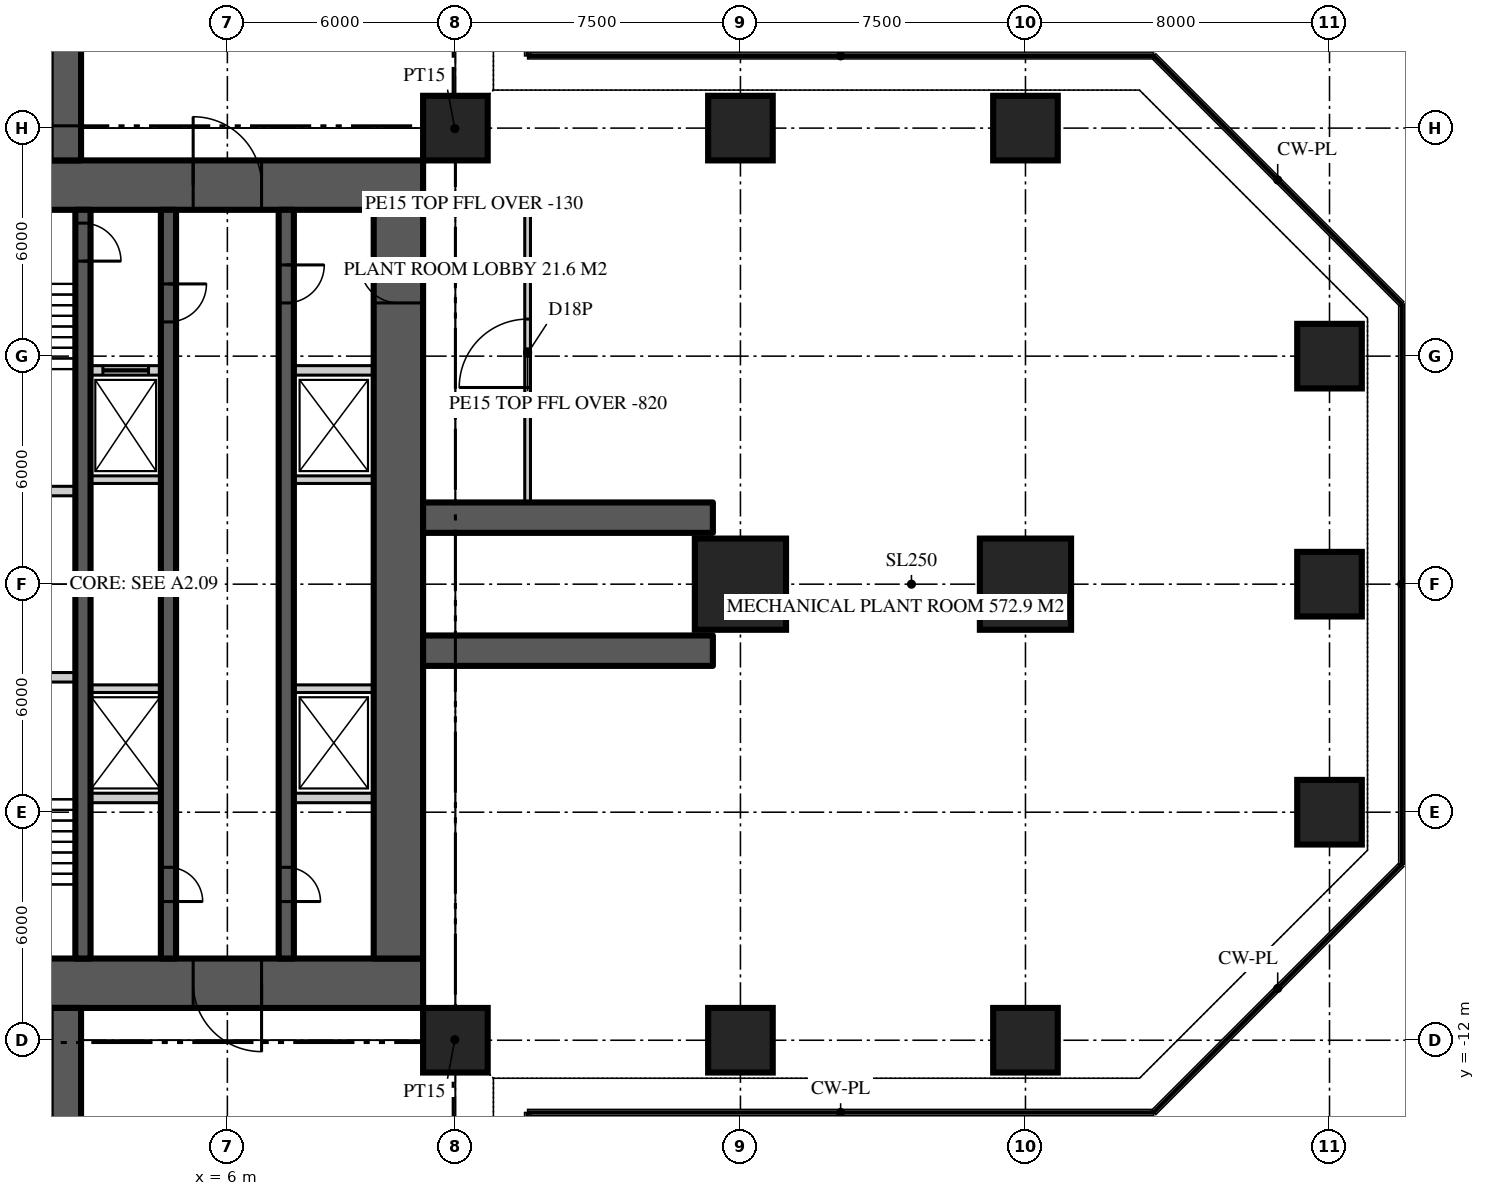
"""IFC4 building model, lengths in metres.
Left out: names, types, materials, properties, quantities, classifications, styles, units other than length and angle.
Written with IfcOpenShell. Run it as: python <this file> out.ifc"""

import sys

from ifc_helpers import new_model, si_unit, direction, frame, frame_2d, origin, origin_2d, place, context, subcontext, project, spatial, rectangle, extrude, element, fill, save


model = new_model("IFC4")
c1 = context("Model", 3, precision=1e-05, world=origin(), true_north=direction((0.0, 1.0)))
c2 = subcontext(c1, "Body", "Model", "MODEL_VIEW")
j1 = project(units=[si_unit("LENGTHUNIT", "METRE"), si_unit("PLANEANGLEUNIT", "RADIAN")], contexts=[c1])
p1 = place(None, origin())
s1 = spatial("IfcSite", under=j1, at=p1, CompositionType="ELEMENT")
p2 = place(p1, origin())
s2 = spatial("IfcBuilding", under=s1, at=p2, CompositionType="ELEMENT")
p3 = place(p2, frame((0.0, 0.0, 37.5)))
s3 = spatial("IfcBuildingStorey", under=s2, at=p3, CompositionType="ELEMENT", Elevation=37.5)
p4 = place(p3, frame((-11.15, 10.5, 0.0), z_axis=(0.0, 0.0, 1.0), x_axis=(1.0, 0.0, 0.0)))
e1 = element("IfcWall", 1, at=p4, inside=s3, PredefinedType="SHEAR", context=c2, shape_type="SweptSolid", body=[
    extrude(rectangle(XDim=22.3, YDim=1.3, at=frame_2d((11.15, 0.0))), origin(), (0.0, 0.0, 1.0), 6.0),
])
p5 = place(p4, frame((4.25, 0.0, 0.0)))
e2 = element("IfcOpeningElement", 2, at=p5, cuts=e1, PredefinedType="OPENING", context=c2, shape_type="SweptSolid", body=[
    extrude(rectangle(XDim=1.8, YDim=2.2, at=frame_2d((0.9, 1.1))), frame((0.0, 0.66, 0.0), z_axis=(0.0, -1.0, 0.0), x_axis=(1.0, 0.0, 0.0)), (0.0, 0.0, 1.0), 1.32),
])
p6 = place(p4, frame((16.25, 0.0, 0.0)))
e3 = element("IfcOpeningElement", 3, at=p6, cuts=e1, PredefinedType="OPENING", context=c2, shape_type="SweptSolid", body=[
    extrude(rectangle(XDim=1.8, YDim=2.2, at=frame_2d((0.9, 1.1))), frame((0.0, 0.66, 0.0), z_axis=(0.0, -1.0, 0.0), x_axis=(1.0, 0.0, 0.0)), (0.0, 0.0, 1.0), 1.32),
])
p7 = place(p3, frame((11.15, -10.5, 0.0), z_axis=(0.0, 0.0, 1.0), x_axis=(-1.0, 0.0, 0.0)))
e4 = element("IfcWall", 4, at=p7, inside=s3, PredefinedType="SHEAR", context=c2, shape_type="SweptSolid", body=[
    extrude(rectangle(XDim=22.3, YDim=1.3, at=frame_2d((11.15, 0.0))), origin(), (0.0, 0.0, 1.0), 6.0),
])
p8 = place(p7, frame((16.25, 0.0, 0.0)))
e5 = element("IfcOpeningElement", 5, at=p8, cuts=e4, PredefinedType="OPENING", context=c2, shape_type="SweptSolid", body=[
    extrude(rectangle(XDim=1.8, YDim=2.2, at=frame_2d((0.9, 1.1))), frame((0.0, 0.66, 0.0), z_axis=(0.0, -1.0, 0.0), x_axis=(1.0, 0.0, 0.0)), (0.0, 0.0, 1.0), 1.32),
])
p9 = place(p7, frame((4.25, 0.0, 0.0)))
e6 = element("IfcOpeningElement", 6, at=p9, cuts=e4, PredefinedType="OPENING", context=c2, shape_type="SweptSolid", body=[
    extrude(rectangle(XDim=1.8, YDim=2.2, at=frame_2d((0.9, 1.1))), frame((0.0, 0.66, 0.0), z_axis=(0.0, -1.0, 0.0), x_axis=(1.0, 0.0, 0.0)), (0.0, 0.0, 1.0), 1.32),
])
p10 = place(p3, frame((10.5, -9.85, 0.0), z_axis=(0.0, 0.0, 1.0), x_axis=(0.0, 1.0, 0.0)))
e7 = element("IfcWall", 7, at=p10, inside=s3, PredefinedType="SHEAR", context=c2, shape_type="SweptSolid", body=[
    extrude(rectangle(XDim=19.7, YDim=1.3, at=frame_2d((9.85, 0.0))), origin(), (0.0, 0.0, 1.0), 6.0),
])
p11 = place(p10, frame((17.25, 0.0, 0.0)))
e8 = element("IfcOpeningElement", 8, at=p11, cuts=e7, PredefinedType="OPENING", context=c2, shape_type="SweptSolid", body=[
    extrude(rectangle(XDim=1.0, YDim=2.2, at=frame_2d((0.5, 1.1))), frame((0.0, 0.66, 0.0), z_axis=(0.0, -1.0, 0.0), x_axis=(1.0, 0.0, 0.0)), (0.0, 0.0, 1.0), 1.32),
])
for number, where, z_axis, x_axis in (
    (9, (11.15, -1.75, 0.0), (0.0, 0.0, 1.0), (1.0, 0.0, 0.0)),
    (10, (11.15, 1.75, 0.0), (0.0, 0.0, 1.0), (1.0, 0.0, 0.0)),
    (11, (1.75, 11.15, 0.0), (0.0, 0.0, 1.0), (0.0, 1.0, 0.0)),
    (12, (1.75, -11.15, 0.0), (0.0, 0.0, 1.0), (0.0, -1.0, 0.0)),
):
    element("IfcWall", number, at=place(p3, frame(where, z_axis=z_axis, x_axis=x_axis)), inside=s3, PredefinedType="SHEAR", context=c2, shape_type="SweptSolid", body=[
        extrude(rectangle(XDim=7.625, YDim=0.8, at=frame_2d((3.812, 0.0))), origin(), (0.0, 0.0, 1.0), 6.0),
    ])
for number, where, z_axis, x_axis in (
    (13, (12.0, -12.0, 0.0), (0.0, 0.0, 1.0), (1.0, 0.0, 0.0)),
    (14, (19.5, -12.0, 0.0), (0.0, 0.0, 1.0), (1.0, 0.0, 0.0)),
    (15, (27.0, -12.0, 0.0), (0.0, 0.0, 1.0), (1.0, 0.0, 0.0)),
    (16, (35.0, -6.0, 0.0), (0.0, 0.0, 1.0), (1.0, 0.0, 0.0)),
):
    element("IfcColumn", number, at=place(p3, frame(where, z_axis=z_axis, x_axis=x_axis)), inside=s3, PredefinedType="COLUMN", context=c2, shape_type="SweptSolid", body=[
        extrude(rectangle(XDim=1.7, YDim=1.7, at=origin_2d()), origin(), (0.0, 0.0, 1.0), 6.0),
    ])
for number, where, z_axis, x_axis in (
    (17, (19.5, 0.0, 0.0), (0.0, 0.0, 1.0), (1.0, 0.0, 0.0)),
    (18, (27.0, 0.0, 0.0), (0.0, 0.0, 1.0), (1.0, 0.0, 0.0)),
):
    element("IfcColumn", number, at=place(p3, frame(where, z_axis=z_axis, x_axis=x_axis)), inside=s3, PredefinedType="COLUMN", context=c2, shape_type="SweptSolid", body=[
        extrude(rectangle(XDim=2.4, YDim=2.4, at=origin_2d()), origin(), (0.0, 0.0, 1.0), 6.0),
    ])
for number, where, z_axis, x_axis in (
    (19, (35.0, 0.0, 0.0), (0.0, 0.0, 1.0), (1.0, 0.0, 0.0)),
    (20, (35.0, 6.0, 0.0), (0.0, 0.0, 1.0), (1.0, 0.0, 0.0)),
    (21, (12.0, 12.0, 0.0), (0.0, 0.0, 1.0), (1.0, 0.0, 0.0)),
    (22, (19.5, 12.0, 0.0), (0.0, 0.0, 1.0), (1.0, 0.0, 0.0)),
    (23, (27.0, 12.0, 0.0), (0.0, 0.0, 1.0), (1.0, 0.0, 0.0)),
):
    element("IfcColumn", number, at=place(p3, frame(where, z_axis=z_axis, x_axis=x_axis)), inside=s3, PredefinedType="COLUMN", context=c2, shape_type="SweptSolid", body=[
        extrude(rectangle(XDim=1.7, YDim=1.7, at=origin_2d()), origin(), (0.0, 0.0, 1.0), 6.0),
    ])
p12 = place(p3, frame((7.55, 9.85, 0.0), z_axis=(0.0, 0.0, 1.0), x_axis=(0.0, -1.0, 0.0)))
e24 = element("IfcWall", 24, at=p12, inside=s3, PredefinedType="SHEAR", context=c2, shape_type="SweptSolid", body=[
    extrude(rectangle(XDim=19.7, YDim=0.4, at=frame_2d((9.85, 0.0))), origin(), (0.0, 0.0, 1.0), 6.0),
])
p13 = place(p12, frame((1.45, 0.0, 0.0)))
e25 = element("IfcOpeningElement", 25, at=p13, cuts=e24, PredefinedType="OPENING", context=c2, shape_type="SweptSolid", body=[
    extrude(rectangle(XDim=1.0, YDim=2.2, at=frame_2d((0.5, 1.1))), frame((0.0, 0.21, 0.0), z_axis=(0.0, -1.0, 0.0), x_axis=(1.0, 0.0, 0.0)), (0.0, 0.0, 1.0), 0.42),
])
p14 = place(p12, frame((17.3, 0.0, 0.0)))
e26 = element("IfcOpeningElement", 26, at=p14, cuts=e24, PredefinedType="OPENING", context=c2, shape_type="SweptSolid", body=[
    extrude(rectangle(XDim=0.9, YDim=2.1, at=frame_2d((0.45, 1.05))), frame((0.0, 0.21, 0.0), z_axis=(0.0, -1.0, 0.0), x_axis=(1.0, 0.0, 0.0)), (0.0, 0.0, 1.0), 0.42),
])
p15 = place(p3, frame((4.45, 9.85, 0.0), z_axis=(0.0, 0.0, 1.0), x_axis=(0.0, -1.0, 0.0)))
e27 = element("IfcWall", 27, at=p15, inside=s3, PredefinedType="SHEAR", context=c2, shape_type="SweptSolid", body=[
    extrude(rectangle(XDim=19.7, YDim=0.4, at=frame_2d((9.85, 0.0))), origin(), (0.0, 0.0, 1.0), 6.0),
])
p16 = place(p15, frame((1.95, 0.0, 0.0)))
e28 = element("IfcOpeningElement", 28, at=p16, cuts=e27, PredefinedType="OPENING", context=c2, shape_type="SweptSolid", body=[
    extrude(rectangle(XDim=1.0, YDim=2.2, at=frame_2d((0.5, 1.1))), frame((0.0, 0.21, 0.0), z_axis=(0.0, -1.0, 0.0), x_axis=(1.0, 0.0, 0.0)), (0.0, 0.0, 1.0), 0.42),
])
p17 = place(p15, frame((17.3, 0.0, 0.0)))
e29 = element("IfcOpeningElement", 29, at=p17, cuts=e27, PredefinedType="OPENING", context=c2, shape_type="SweptSolid", body=[
    extrude(rectangle(XDim=0.9, YDim=2.1, at=frame_2d((0.45, 1.05))), frame((0.0, 0.21, 0.0), z_axis=(0.0, -1.0, 0.0), x_axis=(1.0, 0.0, 0.0)), (0.0, 0.0, 1.0), 0.42),
])
p18 = place(p3, frame((2.2, 9.85, 0.0), z_axis=(0.0, 0.0, 1.0), x_axis=(0.0, -1.0, 0.0)))
e30 = element("IfcWall", 30, at=p18, inside=s3, PredefinedType="SHEAR", context=c2, shape_type="SweptSolid", body=[
    extrude(rectangle(XDim=19.7, YDim=0.4, at=frame_2d((9.85, 0.0))), origin(), (0.0, 0.0, 1.0), 6.0),
])
p19 = place(p18, frame((0.35, 0.0, 0.0)))
e31 = element("IfcOpeningElement", 31, at=p19, cuts=e30, PredefinedType="OPENING", context=c2, shape_type="SweptSolid", body=[
    extrude(rectangle(XDim=1.0, YDim=2.2, at=frame_2d((0.5, 1.1))), frame((0.0, 0.21, 0.0), z_axis=(0.0, -1.0, 0.0), x_axis=(1.0, 0.0, 0.0)), (0.0, 0.0, 1.0), 0.42),
])
p20 = place(p3, frame((2.4, 5.625, 0.0), z_axis=(0.0, 0.0, 1.0), x_axis=(1.0, 0.0, 0.0)))
e32 = element("IfcWall", 32, at=p20, inside=s3, PredefinedType="SOLIDWALL", context=c2, shape_type="SweptSolid", body=[
    extrude(rectangle(XDim=1.85, YDim=0.25, at=frame_2d((0.925, 0.0))), origin(), (0.0, 0.0, 1.0), 5.8),
])
p21 = place(p20, frame((0.325, 0.0, 0.0)))
e33 = element("IfcOpeningElement", 33, at=p21, cuts=e32, PredefinedType="OPENING", context=c2, shape_type="SweptSolid", body=[
    extrude(rectangle(XDim=1.2, YDim=2.2, at=frame_2d((0.6, 1.1))), frame((0.0, 0.135, 0.0), z_axis=(0.0, -1.0, 0.0), x_axis=(1.0, 0.0, 0.0)), (0.0, 0.0, 1.0), 0.27),
])
p22 = place(p3, frame((7.75, 5.625, 0.0), z_axis=(0.0, 0.0, 1.0), x_axis=(1.0, 0.0, 0.0)))
e34 = element("IfcWall", 34, at=p22, inside=s3, PredefinedType="SOLIDWALL", context=c2, shape_type="SweptSolid", body=[
    extrude(rectangle(XDim=2.1, YDim=0.25, at=frame_2d((1.05, 0.0))), origin(), (0.0, 0.0, 1.0), 5.8),
])
p23 = place(p3, frame((2.4, -5.625, 0.0), z_axis=(0.0, 0.0, 1.0), x_axis=(1.0, 0.0, 0.0)))
e35 = element("IfcWall", 35, at=p23, inside=s3, PredefinedType="SOLIDWALL", context=c2, shape_type="SweptSolid", body=[
    extrude(rectangle(XDim=1.85, YDim=0.25, at=frame_2d((0.925, 0.0))), origin(), (0.0, 0.0, 1.0), 5.8),
])
p24 = place(p3, frame((7.75, -5.625, 0.0), z_axis=(0.0, 0.0, 1.0), x_axis=(1.0, 0.0, 0.0)))
e36 = element("IfcWall", 36, at=p24, inside=s3, PredefinedType="SOLIDWALL", context=c2, shape_type="SweptSolid", body=[
    extrude(rectangle(XDim=2.1, YDim=0.25, at=frame_2d((1.05, 0.0))), origin(), (0.0, 0.0, 1.0), 5.8),
])
for number, where, z_axis, x_axis in (
    (37, (-2.0, -2.45, 0.0), (0.0, 0.0, 1.0), (1.0, 0.0, 0.0)),
    (38, (-2.0, 2.45, 0.0), (0.0, 0.0, 1.0), (1.0, 0.0, 0.0)),
):
    element("IfcWall", number, at=place(p3, frame(where, z_axis=z_axis, x_axis=x_axis)), inside=s3, PredefinedType="SOLIDWALL", context=c2, shape_type="SweptSolid", body=[
        extrude(rectangle(XDim=4.0, YDim=0.25, at=frame_2d((2.0, 0.0))), origin(), (0.0, 0.0, 1.0), 5.8),
    ])
p25 = place(p3, frame((2.4, -2.75, 0.0), z_axis=(0.0, 0.0, 1.0), x_axis=(1.0, 0.0, 0.0)))
e39 = element("IfcWall", 39, at=p25, inside=s3, PredefinedType="SOLIDWALL", context=c2, shape_type="SweptSolid", body=[
    extrude(rectangle(XDim=1.85, YDim=0.2, at=frame_2d((0.925, 0.0))), origin(), (0.0, 0.0, 1.0), 5.8),
])
p26 = place(p3, frame((7.75, -2.75, 0.0), z_axis=(0.0, 0.0, 1.0), x_axis=(1.0, 0.0, 0.0)))
e40 = element("IfcWall", 40, at=p26, inside=s3, PredefinedType="SOLIDWALL", context=c2, shape_type="SweptSolid", body=[
    extrude(rectangle(XDim=2.1, YDim=0.2, at=frame_2d((1.05, 0.0))), origin(), (0.0, 0.0, 1.0), 5.8),
])
p27 = place(p3, frame((2.4, 2.75, 0.0), z_axis=(0.0, 0.0, 1.0), x_axis=(1.0, 0.0, 0.0)))
e41 = element("IfcWall", 41, at=p27, inside=s3, PredefinedType="SOLIDWALL", context=c2, shape_type="SweptSolid", body=[
    extrude(rectangle(XDim=1.85, YDim=0.2, at=frame_2d((0.925, 0.0))), origin(), (0.0, 0.0, 1.0), 5.8),
])
p28 = place(p3, frame((7.75, 2.75, 0.0), z_axis=(0.0, 0.0, 1.0), x_axis=(1.0, 0.0, 0.0)))
e42 = element("IfcWall", 42, at=p28, inside=s3, PredefinedType="SOLIDWALL", context=c2, shape_type="SweptSolid", body=[
    extrude(rectangle(XDim=2.1, YDim=0.2, at=frame_2d((1.05, 0.0))), origin(), (0.0, 0.0, 1.0), 5.8),
])
p29 = place(p3, frame((13.9, 2.15, 0.0), z_axis=(0.0, 0.0, 1.0), x_axis=(0.0, 1.0, 0.0)))
e43 = element("IfcWall", 43, at=p29, inside=s3, PredefinedType="SOLIDWALL", context=c2, shape_type="SweptSolid", body=[
    extrude(rectangle(XDim=7.925, YDim=0.15, at=frame_2d((3.962, 0.0))), origin(), (0.0, 0.0, 1.0), 5.18),
])
p30 = place(p29, frame((3.025, 0.0, 0.0)))
e44 = element("IfcOpeningElement", 44, at=p30, cuts=e43, PredefinedType="OPENING", context=c2, shape_type="SweptSolid", body=[
    extrude(rectangle(XDim=1.8, YDim=2.4, at=frame_2d((0.9, 1.2))), frame((0.0, 0.085, 0.0), z_axis=(0.0, -1.0, 0.0), x_axis=(1.0, 0.0, 0.0)), (0.0, 0.0, 1.0), 0.17),
])
p31 = place(p3, frame((11.15, 10.0, 0.0), z_axis=(0.0, 0.0, 1.0), x_axis=(1.0, 0.0, 0.0)))
e45 = element("IfcWall", 45, at=p31, inside=s3, PredefinedType="SOLIDWALL", context=c2, shape_type="SweptSolid", body=[
    extrude(rectangle(XDim=2.675, YDim=0.15, at=frame_2d((1.337, 0.0))), origin(), (0.0, 0.0, 1.0), 5.87),
])
for number, where, z_axis, x_axis in (
    (46, (11.15, 11.15, 0.0), (0.0, 0.0, 1.0), (0.707, 0.707, 0.0)),
    (47, (11.15, -11.15, 0.0), (0.0, 0.0, 1.0), (0.707, -0.707, 0.0)),
):
    element("IfcWall", number, at=place(p3, frame(where, z_axis=z_axis, x_axis=x_axis)), inside=s3, PredefinedType="PARTITIONING", context=c2, shape_type="SweptSolid", body=[
        extrude(rectangle(XDim=2.362, YDim=0.15, at=frame_2d((1.181, 0.0))), origin(), (0.0, 0.0, 1.0), 5.32),
    ])
p32 = place(p6, origin())
e48 = element("IfcDoor", 48, at=p32, inside=s3, OperationType="DOUBLE_DOOR_DOUBLE_SWING", PredefinedType="DOOR", context=c2, shape_type="SweptSolid", body=[
    extrude(rectangle(XDim=1.8, YDim=2.2, at=frame_2d((0.9, 1.1))), frame((0.0, 0.025, 0.0), z_axis=(0.0, -1.0, 0.0), x_axis=(1.0, 0.0, 0.0)), (0.0, 0.0, 1.0), 0.05),
])
fill(e3, e48)
p33 = place(p9, origin())
e49 = element("IfcDoor", 49, at=p33, inside=s3, OperationType="DOUBLE_DOOR_DOUBLE_SWING", PredefinedType="DOOR", context=c2, shape_type="SweptSolid", body=[
    extrude(rectangle(XDim=1.8, YDim=2.2, at=frame_2d((0.9, 1.1))), frame((0.0, 0.025, 0.0), z_axis=(0.0, -1.0, 0.0), x_axis=(1.0, 0.0, 0.0)), (0.0, 0.0, 1.0), 0.05),
])
fill(e6, e49)
p34 = place(p13, origin())
e50 = element("IfcDoor", 50, at=p34, inside=s3, OperationType="SINGLE_SWING_LEFT", PredefinedType="DOOR", context=c2, shape_type="SweptSolid", body=[
    extrude(rectangle(XDim=1.0, YDim=2.2, at=frame_2d((0.5, 1.1))), frame((0.0, 0.025, 0.0), z_axis=(0.0, -1.0, 0.0), x_axis=(1.0, 0.0, 0.0)), (0.0, 0.0, 1.0), 0.05),
])
fill(e25, e50)
p35 = place(p11, origin())
e51 = element("IfcDoor", 51, at=p35, inside=s3, OperationType="SINGLE_SWING_RIGHT", PredefinedType="DOOR", context=c2, shape_type="SweptSolid", body=[
    extrude(rectangle(XDim=1.0, YDim=2.2, at=frame_2d((0.5, 1.1))), frame((0.0, 0.025, 0.0), z_axis=(0.0, -1.0, 0.0), x_axis=(1.0, 0.0, 0.0)), (0.0, 0.0, 1.0), 0.05),
])
fill(e8, e51)
p36 = place(p16, origin())
e52 = element("IfcDoor", 52, at=p36, inside=s3, OperationType="SINGLE_SWING_LEFT", PredefinedType="DOOR", context=c2, shape_type="SweptSolid", body=[
    extrude(rectangle(XDim=1.0, YDim=2.2, at=frame_2d((0.5, 1.1))), frame((0.0, 0.025, 0.0), z_axis=(0.0, -1.0, 0.0), x_axis=(1.0, 0.0, 0.0)), (0.0, 0.0, 1.0), 0.05),
])
fill(e28, e52)
p37 = place(p19, origin())
e53 = element("IfcDoor", 53, at=p37, inside=s3, OperationType="SINGLE_SWING_RIGHT", PredefinedType="DOOR", context=c2, shape_type="SweptSolid", body=[
    extrude(rectangle(XDim=1.0, YDim=2.2, at=frame_2d((0.5, 1.1))), frame((0.0, 0.025, 0.0), z_axis=(0.0, -1.0, 0.0), x_axis=(1.0, 0.0, 0.0)), (0.0, 0.0, 1.0), 0.05),
])
fill(e31, e53)
p38 = place(p14, origin())
e54 = element("IfcDoor", 54, at=p38, inside=s3, OperationType="SINGLE_SWING_RIGHT", PredefinedType="DOOR", context=c2, shape_type="SweptSolid", body=[
    extrude(rectangle(XDim=0.9, YDim=2.1, at=frame_2d((0.45, 1.05))), frame((0.0, 0.025, 0.0), z_axis=(0.0, -1.0, 0.0), x_axis=(1.0, 0.0, 0.0)), (0.0, 0.0, 1.0), 0.05),
])
fill(e26, e54)
p39 = place(p17, origin())
e55 = element("IfcDoor", 55, at=p39, inside=s3, OperationType="SINGLE_SWING_RIGHT", PredefinedType="DOOR", context=c2, shape_type="SweptSolid", body=[
    extrude(rectangle(XDim=0.9, YDim=2.1, at=frame_2d((0.45, 1.05))), frame((0.0, 0.025, 0.0), z_axis=(0.0, -1.0, 0.0), x_axis=(1.0, 0.0, 0.0)), (0.0, 0.0, 1.0), 0.05),
])
fill(e29, e55)
p40 = place(p21, origin())
e56 = element("IfcDoor", 56, at=p40, inside=s3, OperationType="SLIDING_TO_LEFT", PredefinedType="DOOR", context=c2, shape_type="SweptSolid", body=[
    extrude(rectangle(XDim=1.2, YDim=2.2, at=frame_2d((0.6, 1.1))), frame((0.0, 0.025, 0.0), z_axis=(0.0, -1.0, 0.0), x_axis=(1.0, 0.0, 0.0)), (0.0, 0.0, 1.0), 0.05),
])
fill(e33, e56)
p41 = place(p30, origin())
e57 = element("IfcDoor", 57, at=p41, inside=s3, OperationType="DOUBLE_DOOR_DOUBLE_SWING", PredefinedType="DOOR", context=c2, shape_type="SweptSolid", body=[
    extrude(rectangle(XDim=1.8, YDim=2.4, at=frame_2d((0.9, 1.2))), frame((0.0, 0.025, 0.0), z_axis=(0.0, -1.0, 0.0), x_axis=(1.0, 0.0, 0.0)), (0.0, 0.0, 1.0), 0.05),
])
fill(e44, e57)
save(model, sys.argv[1])
